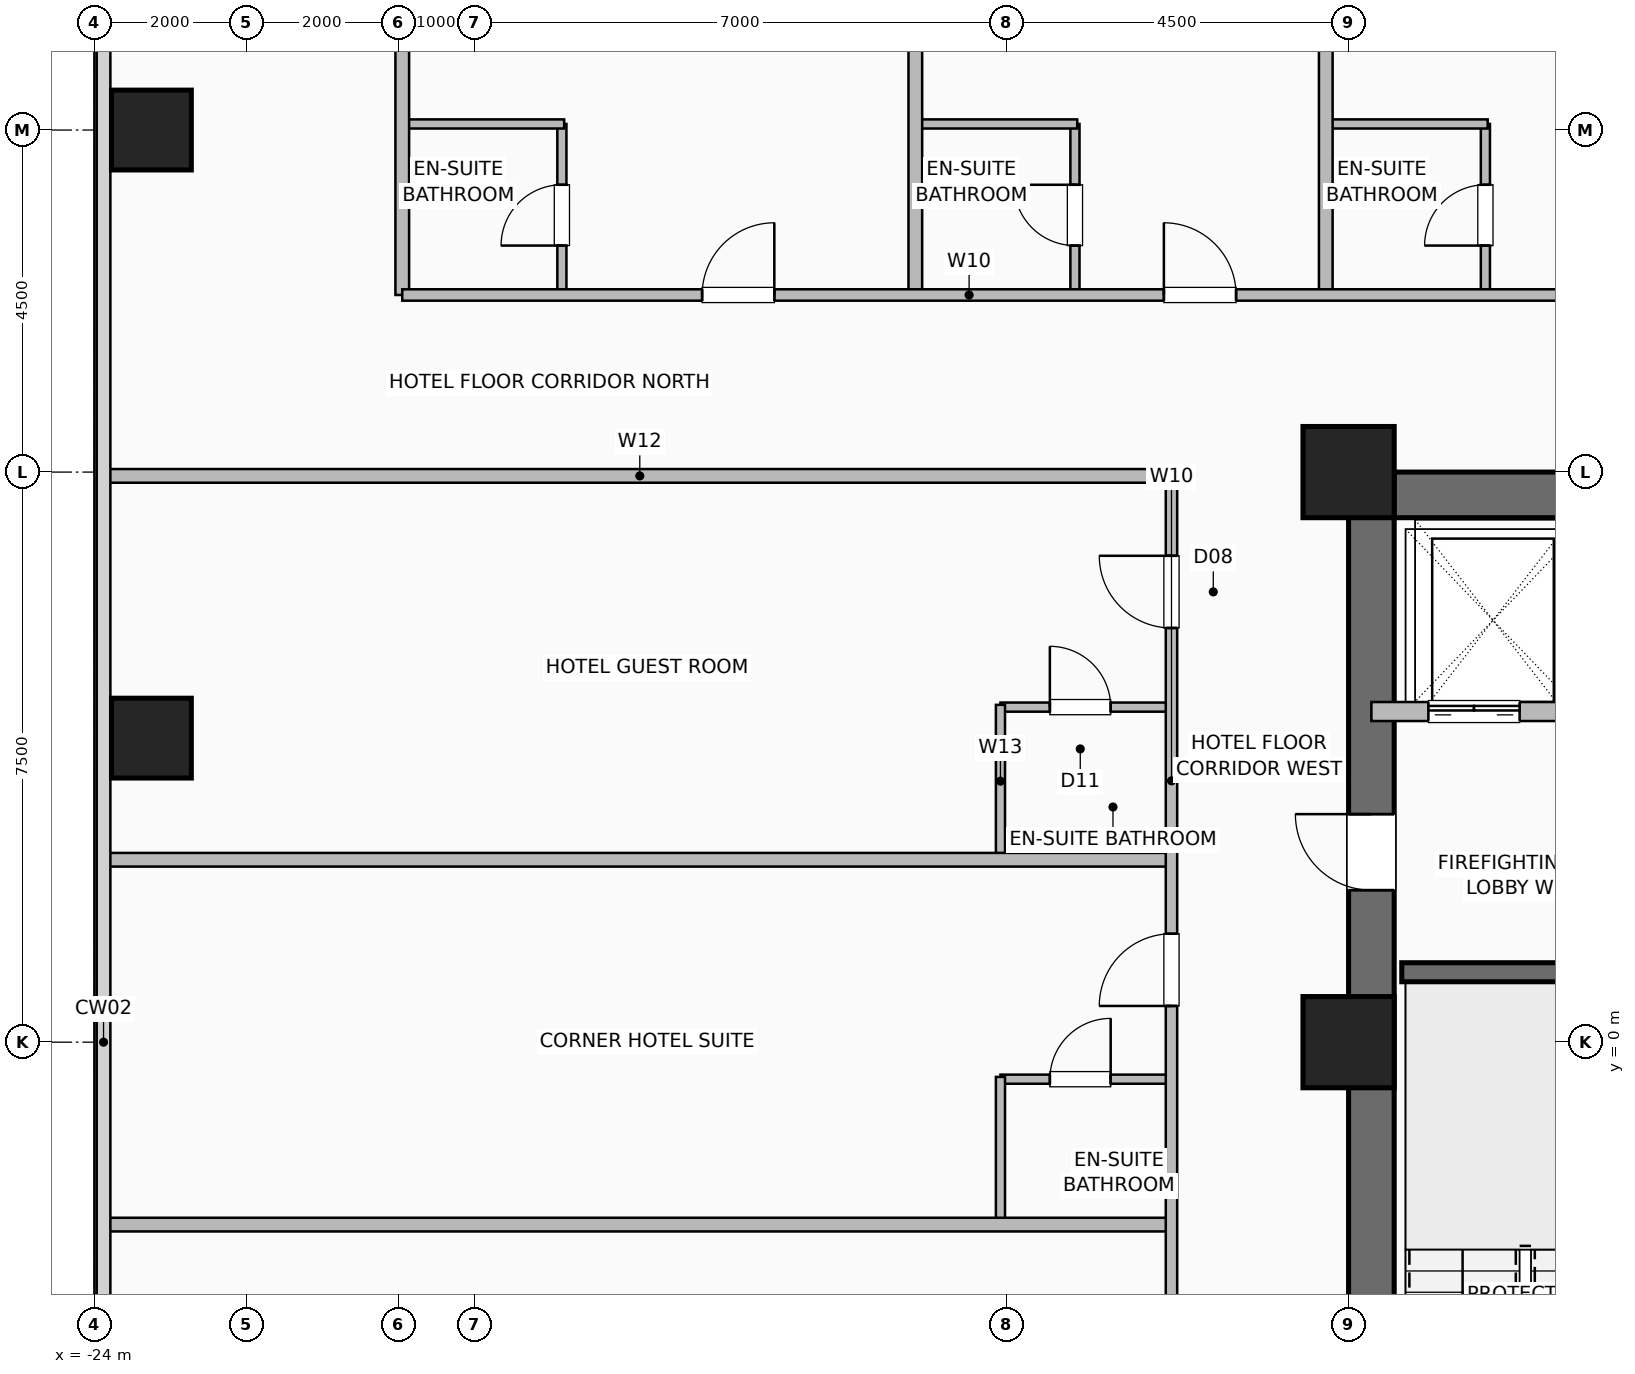
"""IFC4 building model, lengths in metres.
Left out: names, types, materials, properties, quantities, classifications, styles, units other than length and angle.
Written with IfcOpenShell. Run it as: python <this file> out.ifc"""

import sys

from ifc_helpers import new_model, si_unit, direction, frame, frame_2d, origin, origin_2d, place, context, subcontext, project, spatial, rectangle, hollow_rectangle, extrude, element, fill, save


model = new_model("IFC4")
c1 = context("Model", 3, precision=1e-05, world=origin(), true_north=direction((0.0, 1.0)))
c2 = subcontext(c1, "Body", "Model", "MODEL_VIEW")
j1 = project(units=[si_unit("LENGTHUNIT", "METRE"), si_unit("PLANEANGLEUNIT", "RADIAN")], contexts=[c1])
p1 = place(None, origin())
s1 = spatial("IfcSite", under=j1, at=p1, CompositionType="ELEMENT")
p2 = place(p1, origin())
s2 = spatial("IfcBuilding", under=s1, at=p2, CompositionType="ELEMENT")
p3 = place(p2, frame((0.0, 0.0, 30.5)))
s3 = spatial("IfcBuildingStorey", under=s2, at=p3, CompositionType="ELEMENT", Elevation=30.5)
for number, where, z_axis, x_axis in (
    (1, (-7.5, 7.5, 0.0), (0.0, 0.0, 1.0), (1.0, 0.0, 0.0)),
    (2, (-7.5, 0.0, 0.0), (0.0, 0.0, 1.0), (1.0, 0.0, 0.0)),
):
    element("IfcColumn", number, at=place(p3, frame(where, z_axis=z_axis, x_axis=x_axis)), inside=s3, PredefinedType="COLUMN", context=c2, shape_type="SweptSolid", body=[
        extrude(hollow_rectangle(XDim=1.2, YDim=1.2, WallThickness=0.055, at=origin_2d()), origin(), (0.0, 0.0, 1.0), 3.5),
    ])
for number, where, z_axis, x_axis in (
    (3, (-23.25, 4.0, 0.0), (0.0, 0.0, 1.0), (1.0, 0.0, 0.0)),
    (4, (-23.25, 12.0, 0.0), (0.0, 0.0, 1.0), (1.0, 0.0, 0.0)),
):
    element("IfcColumn", number, at=place(p3, frame(where, z_axis=z_axis, x_axis=x_axis)), inside=s3, PredefinedType="COLUMN", context=c2, shape_type="SweptSolid", body=[
        extrude(hollow_rectangle(XDim=1.05, YDim=1.05, WallThickness=0.05, at=origin_2d()), origin(), (0.0, 0.0, 1.0), 3.5),
    ])
p4 = place(p3, frame((-7.5, 7.2, 0.0), z_axis=(0.0, 0.0, 1.0), x_axis=(1.0, 0.0, 0.0)))
e5 = element("IfcWall", 5, at=p4, inside=s3, PredefinedType="SHEAR", context=c2, shape_type="SweptSolid", body=[
    extrude(rectangle(XDim=15.0, YDim=0.6, at=frame_2d((7.5, 0.0))), origin(), (0.0, 0.0, 1.0), 3.25),
])
p5 = place(p3, frame((-7.2, -7.5, 0.0), z_axis=(0.0, 0.0, 1.0), x_axis=(0.0, 1.0, 0.0)))
e6 = element("IfcWall", 6, at=p5, inside=s3, PredefinedType="SHEAR", context=c2, shape_type="SweptSolid", body=[
    extrude(rectangle(XDim=15.0, YDim=0.6, at=frame_2d((7.5, 0.0))), origin(), (0.0, 0.0, 1.0), 3.25),
])
p6 = place(p5, frame((9.5, 0.0, 0.0)))
e7 = element("IfcOpeningElement", 7, at=p6, cuts=e6, PredefinedType="OPENING", context=c2, shape_type="SweptSolid", body=[
    extrude(rectangle(XDim=1.0, YDim=2.08, at=frame_2d((0.5, 1.04))), frame((0.0, 0.31, 0.0), z_axis=(0.0, -1.0, 0.0), x_axis=(1.0, 0.0, 0.0)), (0.0, 0.0, 1.0), 0.62),
])
p7 = place(p3, frame((-6.8, 0.92, 0.0), z_axis=(0.0, 0.0, 1.0), x_axis=(1.0, 0.0, 0.0)))
e8 = element("IfcWall", 8, at=p7, inside=s3, PredefinedType="SHEAR", context=c2, shape_type="SweptSolid", body=[
    extrude(rectangle(XDim=3.33, YDim=0.25, at=frame_2d((1.665, 0.0))), origin(), (0.0, 0.0, 1.0), 3.25),
])
p8 = place(p3, frame((-7.2, 4.35, 0.0), z_axis=(0.0, 0.0, 1.0), x_axis=(1.0, 0.0, 0.0)))
e9 = element("IfcWall", 9, at=p8, inside=s3, PredefinedType="SHEAR", context=c2, shape_type="SweptSolid", body=[
    extrude(rectangle(XDim=2.7, YDim=0.25, at=frame_2d((1.35, 0.0))), origin(), (0.0, 0.0, 1.0), 3.25),
])
p9 = place(p8, frame((0.75, 0.0, 0.0)))
e10 = element("IfcOpeningElement", 10, at=p9, cuts=e9, PredefinedType="OPENING", context=c2, shape_type="SweptSolid", body=[
    extrude(rectangle(XDim=1.2, YDim=2.2, at=frame_2d((0.6, 1.1))), frame((0.0, 0.135, 0.0), z_axis=(0.0, -1.0, 0.0), x_axis=(1.0, 0.0, 0.0)), (0.0, 0.0, 1.0), 0.27),
])
p10 = place(p3, frame((-17.85, 9.83, 0.0), z_axis=(0.0, 0.0, 1.0), x_axis=(0.0, 1.0, 0.0)))
e11 = element("IfcWall", 11, at=p10, inside=s3, PredefinedType="PLUMBINGWALL", context=c2, shape_type="SweptSolid", body=[
    extrude(rectangle(XDim=2.25, YDim=0.12, at=frame_2d((1.125, 0.0))), origin(), (0.0, 0.0, 1.0), 3.25),
])
p11 = place(p10, frame((0.65, 0.0, 0.0)))
e12 = element("IfcOpeningElement", 12, at=p11, cuts=e11, PredefinedType="OPENING", context=c2, shape_type="SweptSolid", body=[
    extrude(rectangle(XDim=0.8, YDim=2.05, at=frame_2d((0.4, 1.025))), frame((0.0, 0.07, 0.0), z_axis=(0.0, -1.0, 0.0), x_axis=(1.0, 0.0, 0.0)), (0.0, 0.0, 1.0), 0.14),
])
p12 = place(p3, frame((-19.92, 12.08, 0.0), z_axis=(0.0, 0.0, 1.0), x_axis=(1.0, 0.0, 0.0)))
e13 = element("IfcWall", 13, at=p12, inside=s3, PredefinedType="PLUMBINGWALL", context=c2, shape_type="SweptSolid", body=[
    extrude(rectangle(XDim=2.1, YDim=0.12, at=frame_2d((1.05, 0.0))), origin(), (0.0, 0.0, 1.0), 3.25),
])
p13 = place(p3, frame((-11.1, 9.83, 0.0), z_axis=(0.0, 0.0, 1.0), x_axis=(0.0, 1.0, 0.0)))
e14 = element("IfcWall", 14, at=p13, inside=s3, PredefinedType="PLUMBINGWALL", context=c2, shape_type="SweptSolid", body=[
    extrude(rectangle(XDim=2.25, YDim=0.12, at=frame_2d((1.125, 0.0))), origin(), (0.0, 0.0, 1.0), 3.25),
])
p14 = place(p13, frame((0.65, 0.0, 0.0)))
e15 = element("IfcOpeningElement", 15, at=p14, cuts=e14, PredefinedType="OPENING", context=c2, shape_type="SweptSolid", body=[
    extrude(rectangle(XDim=0.8, YDim=2.05, at=frame_2d((0.4, 1.025))), frame((0.0, 0.07, 0.0), z_axis=(0.0, -1.0, 0.0), x_axis=(1.0, 0.0, 0.0)), (0.0, 0.0, 1.0), 0.14),
])
p15 = place(p3, frame((-13.17, 12.08, 0.0), z_axis=(0.0, 0.0, 1.0), x_axis=(1.0, 0.0, 0.0)))
e16 = element("IfcWall", 16, at=p15, inside=s3, PredefinedType="PLUMBINGWALL", context=c2, shape_type="SweptSolid", body=[
    extrude(rectangle(XDim=2.1, YDim=0.12, at=frame_2d((1.05, 0.0))), origin(), (0.0, 0.0, 1.0), 3.25),
])
p16 = place(p3, frame((-5.7, 9.83, 0.0), z_axis=(0.0, 0.0, 1.0), x_axis=(0.0, 1.0, 0.0)))
e17 = element("IfcWall", 17, at=p16, inside=s3, PredefinedType="PLUMBINGWALL", context=c2, shape_type="SweptSolid", body=[
    extrude(rectangle(XDim=2.25, YDim=0.12, at=frame_2d((1.125, 0.0))), origin(), (0.0, 0.0, 1.0), 3.25),
])
p17 = place(p16, frame((0.65, 0.0, 0.0)))
e18 = element("IfcOpeningElement", 18, at=p17, cuts=e17, PredefinedType="OPENING", context=c2, shape_type="SweptSolid", body=[
    extrude(rectangle(XDim=0.8, YDim=2.05, at=frame_2d((0.4, 1.025))), frame((0.0, 0.07, 0.0), z_axis=(0.0, -1.0, 0.0), x_axis=(1.0, 0.0, 0.0)), (0.0, 0.0, 1.0), 0.14),
])
p18 = place(p3, frame((-7.77, 12.08, 0.0), z_axis=(0.0, 0.0, 1.0), x_axis=(1.0, 0.0, 0.0)))
e19 = element("IfcWall", 19, at=p18, inside=s3, PredefinedType="PLUMBINGWALL", context=c2, shape_type="SweptSolid", body=[
    extrude(rectangle(XDim=2.1, YDim=0.12, at=frame_2d((1.05, 0.0))), origin(), (0.0, 0.0, 1.0), 3.25),
])
for number, where, z_axis, x_axis in (
    (20, (-19.95, 9.83, 0.0), (0.0, 0.0, 1.0), (0.0, 1.0, 0.0)),
    (21, (-13.2, 9.83, 0.0), (0.0, 0.0, 1.0), (0.0, 1.0, 0.0)),
    (22, (-7.8, 9.83, 0.0), (0.0, 0.0, 1.0), (0.0, 1.0, 0.0)),
):
    element("IfcWall", number, at=place(p3, frame(where, z_axis=z_axis, x_axis=x_axis)), inside=s3, PredefinedType="PARTITIONING", context=c2, shape_type="SweptSolid", body=[
        extrude(rectangle(XDim=13.99, YDim=0.18, at=frame_2d((6.995, 0.0))), origin(), (0.0, 0.0, 1.0), 3.25),
    ])
p19 = place(p3, frame((-19.95, 9.83, 0.0), z_axis=(0.0, 0.0, 1.0), x_axis=(1.0, 0.0, 0.0)))
e23 = element("IfcWall", 23, at=p19, inside=s3, PredefinedType="PARTITIONING", context=c2, shape_type="SweptSolid", body=[
    extrude(rectangle(XDim=39.9, YDim=0.15, at=frame_2d((19.95, 0.0))), origin(), (0.0, 0.0, 1.0), 3.25),
])
p20 = place(p19, frame((3.945, 0.0, 0.0)))
e24 = element("IfcOpeningElement", 24, at=p20, cuts=e23, PredefinedType="OPENING", context=c2, shape_type="SweptSolid", body=[
    extrude(rectangle(XDim=0.95, YDim=2.08, at=frame_2d((0.475, 1.04))), frame((0.0, 0.085, 0.0), z_axis=(0.0, -1.0, 0.0), x_axis=(1.0, 0.0, 0.0)), (0.0, 0.0, 1.0), 0.17),
])
p21 = place(p19, frame((10.02, 0.0, 0.0)))
e25 = element("IfcOpeningElement", 25, at=p21, cuts=e23, PredefinedType="OPENING", context=c2, shape_type="SweptSolid", body=[
    extrude(rectangle(XDim=0.95, YDim=2.08, at=frame_2d((0.475, 1.04))), frame((0.0, 0.085, 0.0), z_axis=(0.0, -1.0, 0.0), x_axis=(1.0, 0.0, 0.0)), (0.0, 0.0, 1.0), 0.17),
])
p22 = place(p19, frame((15.42, 0.0, 0.0)))
e26 = element("IfcOpeningElement", 26, at=p22, cuts=e23, PredefinedType="OPENING", context=c2, shape_type="SweptSolid", body=[
    extrude(rectangle(XDim=0.95, YDim=2.08, at=frame_2d((0.475, 1.04))), frame((0.0, 0.085, 0.0), z_axis=(0.0, -1.0, 0.0), x_axis=(1.0, 0.0, 0.0)), (0.0, 0.0, 1.0), 0.17),
])
p23 = place(p19, frame((20.702, 0.0, 0.0)))
e27 = element("IfcOpeningElement", 27, at=p23, cuts=e23, PredefinedType="OPENING", context=c2, shape_type="SweptSolid", body=[
    extrude(rectangle(XDim=0.95, YDim=2.08, at=frame_2d((0.475, 1.04))), frame((0.0, 0.085, 0.0), z_axis=(0.0, -1.0, 0.0), x_axis=(1.0, 0.0, 0.0)), (0.0, 0.0, 1.0), 0.17),
])
p24 = place(p19, frame((26.02, 0.0, 0.0)))
e28 = element("IfcOpeningElement", 28, at=p24, cuts=e23, PredefinedType="OPENING", context=c2, shape_type="SweptSolid", body=[
    extrude(rectangle(XDim=0.95, YDim=2.08, at=frame_2d((0.475, 1.04))), frame((0.0, 0.085, 0.0), z_axis=(0.0, -1.0, 0.0), x_axis=(1.0, 0.0, 0.0)), (0.0, 0.0, 1.0), 0.17),
])
p25 = place(p19, frame((31.37, 0.0, 0.0)))
e29 = element("IfcOpeningElement", 29, at=p25, cuts=e23, PredefinedType="OPENING", context=c2, shape_type="SweptSolid", body=[
    extrude(rectangle(XDim=0.95, YDim=2.08, at=frame_2d((0.475, 1.04))), frame((0.0, 0.085, 0.0), z_axis=(0.0, -1.0, 0.0), x_axis=(1.0, 0.0, 0.0)), (0.0, 0.0, 1.0), 0.17),
])
p26 = place(p19, frame((37.245, 0.0, 0.0)))
e30 = element("IfcOpeningElement", 30, at=p26, cuts=e23, PredefinedType="OPENING", context=c2, shape_type="SweptSolid", body=[
    extrude(rectangle(XDim=0.95, YDim=2.08, at=frame_2d((0.475, 1.04))), frame((0.0, 0.085, 0.0), z_axis=(0.0, -1.0, 0.0), x_axis=(1.0, 0.0, 0.0)), (0.0, 0.0, 1.0), 0.17),
])
p27 = place(p3, frame((-12.08, -0.487, 0.0), z_axis=(0.0, 0.0, 1.0), x_axis=(1.0, 0.0, 0.0)))
e31 = element("IfcWall", 31, at=p27, inside=s3, PredefinedType="PLUMBINGWALL", context=c2, shape_type="SweptSolid", body=[
    extrude(rectangle(XDim=2.25, YDim=0.12, at=frame_2d((1.125, 0.0))), origin(), (0.0, 0.0, 1.0), 3.25),
])
p28 = place(p27, frame((0.65, 0.0, 0.0)))
e32 = element("IfcOpeningElement", 32, at=p28, cuts=e31, PredefinedType="OPENING", context=c2, shape_type="SweptSolid", body=[
    extrude(rectangle(XDim=0.8, YDim=2.05, at=frame_2d((0.4, 1.025))), frame((0.0, 0.07, 0.0), z_axis=(0.0, -1.0, 0.0), x_axis=(1.0, 0.0, 0.0)), (0.0, 0.0, 1.0), 0.14),
])
p29 = place(p3, frame((-12.08, -2.37, 0.0), z_axis=(0.0, 0.0, 1.0), x_axis=(0.0, 1.0, 0.0)))
e33 = element("IfcWall", 33, at=p29, inside=s3, PredefinedType="PLUMBINGWALL", context=c2, shape_type="SweptSolid", body=[
    extrude(rectangle(XDim=1.913, YDim=0.12, at=frame_2d((0.957, 0.0))), origin(), (0.0, 0.0, 1.0), 3.25),
])
p30 = place(p3, frame((-12.08, 4.408, 0.0), z_axis=(0.0, 0.0, 1.0), x_axis=(1.0, 0.0, 0.0)))
e34 = element("IfcWall", 34, at=p30, inside=s3, PredefinedType="PLUMBINGWALL", context=c2, shape_type="SweptSolid", body=[
    extrude(rectangle(XDim=2.25, YDim=0.12, at=frame_2d((1.125, 0.0))), origin(), (0.0, 0.0, 1.0), 3.25),
])
p31 = place(p30, frame((0.65, 0.0, 0.0)))
e35 = element("IfcOpeningElement", 35, at=p31, cuts=e34, PredefinedType="OPENING", context=c2, shape_type="SweptSolid", body=[
    extrude(rectangle(XDim=0.8, YDim=2.05, at=frame_2d((0.4, 1.025))), frame((0.0, 0.07, 0.0), z_axis=(0.0, -1.0, 0.0), x_axis=(1.0, 0.0, 0.0)), (0.0, 0.0, 1.0), 0.14),
])
p32 = place(p3, frame((-12.08, 2.43, 0.0), z_axis=(0.0, 0.0, 1.0), x_axis=(0.0, 1.0, 0.0)))
e36 = element("IfcWall", 36, at=p32, inside=s3, PredefinedType="PLUMBINGWALL", context=c2, shape_type="SweptSolid", body=[
    extrude(rectangle(XDim=2.008, YDim=0.12, at=frame_2d((1.004, 0.0))), origin(), (0.0, 0.0, 1.0), 3.25),
])
for number, where, z_axis, x_axis in (
    (37, (-23.82, -2.4, 0.0), (0.0, 0.0, 1.0), (1.0, 0.0, 0.0)),
    (38, (-23.82, 2.4, 0.0), (0.0, 0.0, 1.0), (1.0, 0.0, 0.0)),
    (39, (-23.82, 7.45, 0.0), (0.0, 0.0, 1.0), (1.0, 0.0, 0.0)),
):
    element("IfcWall", number, at=place(p3, frame(where, z_axis=z_axis, x_axis=x_axis)), inside=s3, PredefinedType="PARTITIONING", context=c2, shape_type="SweptSolid", body=[
        extrude(rectangle(XDim=13.99, YDim=0.18, at=frame_2d((6.995, 0.0))), origin(), (0.0, 0.0, 1.0), 3.25),
    ])
p33 = place(p3, frame((-9.83, -7.45, 0.0), z_axis=(0.0, 0.0, 1.0), x_axis=(0.0, 1.0, 0.0)))
e40 = element("IfcWall", 40, at=p33, inside=s3, PredefinedType="PARTITIONING", context=c2, shape_type="SweptSolid", body=[
    extrude(rectangle(XDim=14.9, YDim=0.15, at=frame_2d((7.45, 0.0))), origin(), (0.0, 0.0, 1.0), 3.25),
])
p34 = place(p33, frame((3.049, 0.0, 0.0)))
e41 = element("IfcOpeningElement", 41, at=p34, cuts=e40, PredefinedType="OPENING", context=c2, shape_type="SweptSolid", body=[
    extrude(rectangle(XDim=0.95, YDim=2.08, at=frame_2d((0.475, 1.04))), frame((0.0, 0.085, 0.0), z_axis=(0.0, -1.0, 0.0), x_axis=(1.0, 0.0, 0.0)), (0.0, 0.0, 1.0), 0.17),
])
p35 = place(p33, frame((7.927, 0.0, 0.0)))
e42 = element("IfcOpeningElement", 42, at=p35, cuts=e40, PredefinedType="OPENING", context=c2, shape_type="SweptSolid", body=[
    extrude(rectangle(XDim=0.95, YDim=2.08, at=frame_2d((0.475, 1.04))), frame((0.0, 0.085, 0.0), z_axis=(0.0, -1.0, 0.0), x_axis=(1.0, 0.0, 0.0)), (0.0, 0.0, 1.0), 0.17),
])
p36 = place(p33, frame((12.899, 0.0, 0.0)))
e43 = element("IfcOpeningElement", 43, at=p36, cuts=e40, PredefinedType="OPENING", context=c2, shape_type="SweptSolid", body=[
    extrude(rectangle(XDim=0.95, YDim=2.08, at=frame_2d((0.475, 1.04))), frame((0.0, 0.085, 0.0), z_axis=(0.0, -1.0, 0.0), x_axis=(1.0, 0.0, 0.0)), (0.0, 0.0, 1.0), 0.17),
])
p37 = place(p6, origin())
e44 = element("IfcDoor", 44, at=p37, inside=s3, OperationType="SINGLE_SWING_RIGHT", PredefinedType="DOOR", context=c2, shape_type="SweptSolid", body=[
    extrude(rectangle(XDim=1.0, YDim=2.08, at=frame_2d((0.5, 1.04))), frame((0.0, 0.025, 0.0), z_axis=(0.0, -1.0, 0.0), x_axis=(1.0, 0.0, 0.0)), (0.0, 0.0, 1.0), 0.05),
])
fill(e7, e44)
p38 = place(p9, origin())
e45 = element("IfcDoor", 45, at=p38, inside=s3, OperationType="DOUBLE_DOOR_SLIDING", PredefinedType="DOOR", context=c2, shape_type="SweptSolid", body=[
    extrude(rectangle(XDim=1.2, YDim=2.2, at=frame_2d((0.6, 1.1))), frame((0.0, 0.025, 0.0), z_axis=(0.0, -1.0, 0.0), x_axis=(1.0, 0.0, 0.0)), (0.0, 0.0, 1.0), 0.05),
])
fill(e10, e45)
p39 = place(p11, origin())
e46 = element("IfcDoor", 46, at=p39, inside=s3, OperationType="SINGLE_SWING_LEFT", PredefinedType="DOOR", context=c2, shape_type="SweptSolid", body=[
    extrude(rectangle(XDim=0.8, YDim=2.05, at=frame_2d((0.4, 1.025))), frame((0.0, 0.025, 0.0), z_axis=(0.0, -1.0, 0.0), x_axis=(1.0, 0.0, 0.0)), (0.0, 0.0, 1.0), 0.05),
])
fill(e12, e46)
p40 = place(p14, origin())
e47 = element("IfcDoor", 47, at=p40, inside=s3, OperationType="SINGLE_SWING_RIGHT", PredefinedType="DOOR", context=c2, shape_type="SweptSolid", body=[
    extrude(rectangle(XDim=0.8, YDim=2.05, at=frame_2d((0.4, 1.025))), frame((0.0, 0.025, 0.0), z_axis=(0.0, -1.0, 0.0), x_axis=(1.0, 0.0, 0.0)), (0.0, 0.0, 1.0), 0.05),
])
fill(e15, e47)
p41 = place(p17, origin())
e48 = element("IfcDoor", 48, at=p41, inside=s3, OperationType="SINGLE_SWING_LEFT", PredefinedType="DOOR", context=c2, shape_type="SweptSolid", body=[
    extrude(rectangle(XDim=0.8, YDim=2.05, at=frame_2d((0.4, 1.025))), frame((0.0, 0.025, 0.0), z_axis=(0.0, -1.0, 0.0), x_axis=(1.0, 0.0, 0.0)), (0.0, 0.0, 1.0), 0.05),
])
fill(e18, e48)
p42 = place(p20, origin())
e49 = element("IfcDoor", 49, at=p42, inside=s3, OperationType="SINGLE_SWING_RIGHT", PredefinedType="DOOR", context=c2, shape_type="SweptSolid", body=[
    extrude(rectangle(XDim=0.95, YDim=2.08, at=frame_2d((0.475, 1.04))), frame((0.0, 0.025, 0.0), z_axis=(0.0, -1.0, 0.0), x_axis=(1.0, 0.0, 0.0)), (0.0, 0.0, 1.0), 0.05),
])
fill(e24, e49)
p43 = place(p21, origin())
e50 = element("IfcDoor", 50, at=p43, inside=s3, OperationType="SINGLE_SWING_LEFT", PredefinedType="DOOR", context=c2, shape_type="SweptSolid", body=[
    extrude(rectangle(XDim=0.95, YDim=2.08, at=frame_2d((0.475, 1.04))), frame((0.0, 0.025, 0.0), z_axis=(0.0, -1.0, 0.0), x_axis=(1.0, 0.0, 0.0)), (0.0, 0.0, 1.0), 0.05),
])
fill(e25, e50)
p44 = place(p28, origin())
e51 = element("IfcDoor", 51, at=p44, inside=s3, OperationType="SINGLE_SWING_RIGHT", PredefinedType="DOOR", context=c2, shape_type="SweptSolid", body=[
    extrude(rectangle(XDim=0.8, YDim=2.05, at=frame_2d((0.4, 1.025))), frame((0.0, 0.025, 0.0), z_axis=(0.0, -1.0, 0.0), x_axis=(1.0, 0.0, 0.0)), (0.0, 0.0, 1.0), 0.05),
])
fill(e32, e51)
p45 = place(p31, origin())
e52 = element("IfcDoor", 52, at=p45, inside=s3, OperationType="SINGLE_SWING_LEFT", PredefinedType="DOOR", context=c2, shape_type="SweptSolid", body=[
    extrude(rectangle(XDim=0.8, YDim=2.05, at=frame_2d((0.4, 1.025))), frame((0.0, 0.025, 0.0), z_axis=(0.0, -1.0, 0.0), x_axis=(1.0, 0.0, 0.0)), (0.0, 0.0, 1.0), 0.05),
])
fill(e35, e52)
p46 = place(p35, origin())
e53 = element("IfcDoor", 53, at=p46, inside=s3, OperationType="SINGLE_SWING_LEFT", PredefinedType="DOOR", context=c2, shape_type="SweptSolid", body=[
    extrude(rectangle(XDim=0.95, YDim=2.08, at=frame_2d((0.475, 1.04))), frame((0.0, 0.025, 0.0), z_axis=(0.0, -1.0, 0.0), x_axis=(1.0, 0.0, 0.0)), (0.0, 0.0, 1.0), 0.05),
])
fill(e42, e53)
p47 = place(p36, origin())
e54 = element("IfcDoor", 54, at=p47, inside=s3, OperationType="SINGLE_SWING_RIGHT", PredefinedType="DOOR", context=c2, shape_type="SweptSolid", body=[
    extrude(rectangle(XDim=0.95, YDim=2.08, at=frame_2d((0.475, 1.04))), frame((0.0, 0.025, 0.0), z_axis=(0.0, -1.0, 0.0), x_axis=(1.0, 0.0, 0.0)), (0.0, 0.0, 1.0), 0.05),
])
fill(e43, e54)
save(model, sys.argv[1])
